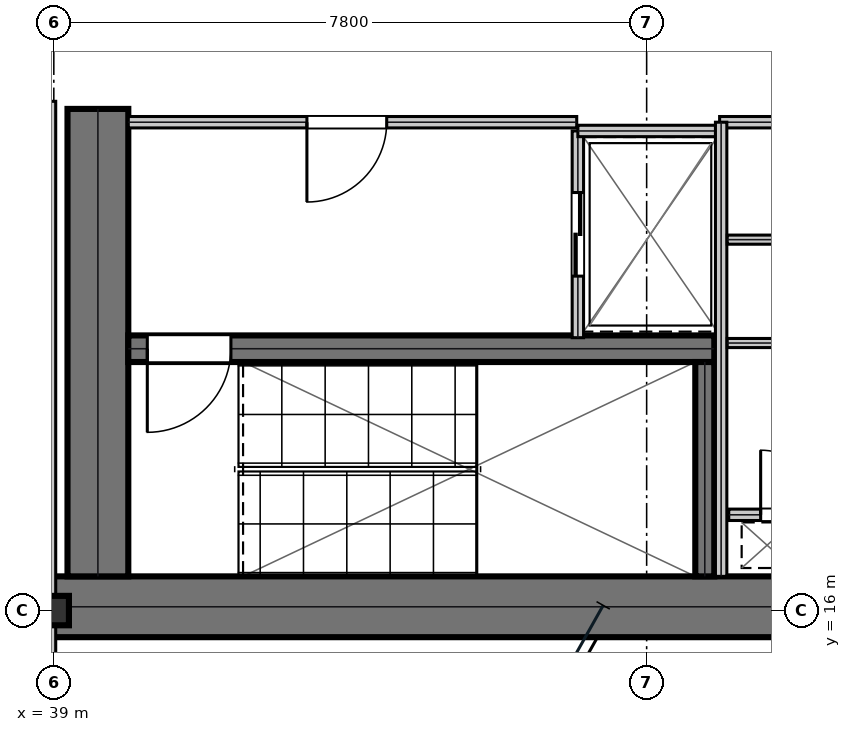
"""IFC4 building model, lengths in metres.
Left out: names, types, materials, properties, quantities, classifications, styles, units other than length and angle.
Written with IfcOpenShell. Run it as: python <this file> out.ifc"""

import sys

from ifc_helpers import new_model, si_unit, direction, frame, frame_2d, origin, origin_2d, place, context, subcontext, project, spatial, rectangle, i_section, extrude, element, fill, save


model = new_model("IFC4")
c1 = context("Model", 3, precision=1e-05, world=origin(), true_north=direction((0.0, 1.0)))
c2 = subcontext(c1, "Body", "Model", "MODEL_VIEW")
j1 = project(units=[si_unit("LENGTHUNIT", "METRE"), si_unit("PLANEANGLEUNIT", "RADIAN")], contexts=[c1])
p1 = place(None, origin())
s1 = spatial("IfcSite", under=j1, at=p1, CompositionType="ELEMENT")
p2 = place(p1, origin())
s2 = spatial("IfcBuilding", under=s1, at=p2, CompositionType="ELEMENT")
p3 = place(p2, frame((0.0, 0.0, 165.45)))
s3 = spatial("IfcBuildingStorey", under=s2, at=p3, CompositionType="ELEMENT", Elevation=165.45)
p4 = place(p3, frame((38.8, 16.05, 0.0), z_axis=(0.0, 0.0, 1.0), x_axis=(1.0, 0.0, 0.0)))
e1 = element("IfcWall", 1, at=p4, inside=s3, PredefinedType="SHEAR", context=c2, shape_type="SweptSolid", body=[
    extrude(rectangle(XDim=16.0, YDim=0.8, at=frame_2d((8.0, 0.0))), origin(), (0.0, 0.0, 1.0), 3.81),
])
p5 = place(p3, frame((39.58, 16.45, 0.0), z_axis=(0.0, 0.0, 1.0), x_axis=(0.0, 1.0, 0.0)))
e2 = element("IfcWall", 2, at=p5, inside=s3, PredefinedType="SHEAR", context=c2, shape_type="SweptSolid", body=[
    extrude(rectangle(XDim=6.15, YDim=0.8, at=frame_2d((3.075, 0.0))), origin(), (0.0, 0.0, 1.0), 3.81),
])
p6 = place(p3, frame((39.98, 19.445, 0.0), z_axis=(0.0, 0.0, 1.0), x_axis=(1.0, 0.0, 0.0)))
e3 = element("IfcWall", 3, at=p6, inside=s3, PredefinedType="SHEAR", context=c2, shape_type="SweptSolid", body=[
    extrude(rectangle(XDim=7.71, YDim=0.35, at=frame_2d((3.855, 0.0))), origin(), (0.0, 0.0, 1.0), 3.81),
])
p7 = place(p6, frame((0.25, 0.0, 0.0)))
e4 = element("IfcOpeningElement", 4, at=p7, cuts=e3, PredefinedType="OPENING", context=c2, shape_type="SweptSolid", body=[
    extrude(rectangle(XDim=1.1, YDim=2.15, at=frame_2d((0.55, 1.075))), frame((0.0, 0.185, 0.0), z_axis=(0.0, -1.0, 0.0), x_axis=(1.0, 0.0, 0.0)), (0.0, 0.0, 1.0), 0.37),
])
p8 = place(p3, frame((47.565, 16.45, 0.0), z_axis=(0.0, 0.0, 1.0), x_axis=(0.0, 1.0, 0.0)))
e5 = element("IfcWall", 5, at=p8, inside=s3, PredefinedType="SHEAR", context=c2, shape_type="SweptSolid", body=[
    extrude(rectangle(XDim=2.82, YDim=0.25, at=frame_2d((1.41, 0.0))), origin(), (0.0, 0.0, 1.0), 3.81),
])
p9 = place(p3, frame((39.0, 16.0, 0.0), z_axis=(0.0, 0.0, 1.0), x_axis=(1.0, 0.0, 0.0)))
e6 = element("IfcColumn", 6, at=p9, inside=s3, PredefinedType="COLUMN", context=c2, shape_type="SweptSolid", body=[
    extrude(i_section(OverallWidth=0.398, OverallDepth=0.387, WebThickness=0.021, FlangeThickness=0.033, at=origin_2d()), origin(), (0.0, 0.0, 1.0), 4.044),
])
p10 = place(p3, frame((39.98, 22.425, 0.0), z_axis=(0.0, 0.0, 1.0), x_axis=(1.0, 0.0, 0.0)))
e7 = element("IfcWall", 7, at=p10, inside=s3, PredefinedType="PARTITIONING", context=c2, shape_type="SweptSolid", body=[
    extrude(rectangle(XDim=5.9, YDim=0.15, at=frame_2d((2.95, 0.0))), origin(), (0.0, 0.0, 1.0), 3.81),
])
p11 = place(p10, frame((2.35, 0.0, 0.0)))
e8 = element("IfcOpeningElement", 8, at=p11, cuts=e7, PredefinedType="OPENING", context=c2, shape_type="SweptSolid", body=[
    extrude(rectangle(XDim=1.05, YDim=2.15, at=frame_2d((0.525, 1.075))), frame((0.0, 0.085, 0.0), z_axis=(0.0, -1.0, 0.0), x_axis=(1.0, 0.0, 0.0)), (0.0, 0.0, 1.0), 0.17),
])
p12 = place(p3, frame((45.895, 19.59, 0.0), z_axis=(0.0, 0.0, 1.0), x_axis=(0.0, 1.0, 0.0)))
e9 = element("IfcWall", 9, at=p12, inside=s3, PredefinedType="PARTITIONING", context=c2, shape_type="SweptSolid", body=[
    extrude(rectangle(XDim=2.72, YDim=0.15, at=frame_2d((1.36, 0.0))), origin(), (0.0, 0.0, 1.0), 3.81),
])
p13 = place(p12, frame((0.81, 0.0, 0.0)))
e10 = element("IfcOpeningElement", 10, at=p13, cuts=e9, PredefinedType="OPENING", context=c2, shape_type="SweptSolid", body=[
    extrude(rectangle(XDim=1.1, YDim=2.15, at=frame_2d((0.55, 1.075))), frame((0.0, 0.085, 0.0), z_axis=(0.0, -1.0, 0.0), x_axis=(1.0, 0.0, 0.0)), (0.0, 0.0, 1.0), 0.17),
])
p14 = place(p3, frame((45.895, 22.31, 0.0), z_axis=(0.0, 0.0, 1.0), x_axis=(1.0, 0.0, 0.0)))
e11 = element("IfcWall", 11, at=p14, inside=s3, PredefinedType="PARTITIONING", context=c2, shape_type="SweptSolid", body=[
    extrude(rectangle(XDim=1.915, YDim=0.15, at=frame_2d((0.958, 0.0))), origin(), (0.0, 0.0, 1.0), 3.81),
])
p15 = place(p3, frame((47.88, 17.26, 0.0), z_axis=(0.0, 0.0, 1.0), x_axis=(1.0, 0.0, 0.0)))
e12 = element("IfcWall", 12, at=p15, inside=s3, PredefinedType="PARTITIONING", context=c2, shape_type="SweptSolid", body=[
    extrude(rectangle(XDim=1.72, YDim=0.15, at=frame_2d((0.86, 0.0))), origin(), (0.0, 0.0, 1.0), 3.81),
])
p16 = place(p15, frame((0.42, 0.0, 0.0)))
e13 = element("IfcOpeningElement", 13, at=p16, cuts=e12, PredefinedType="OPENING", context=c2, shape_type="SweptSolid", body=[
    extrude(rectangle(XDim=0.85, YDim=2.15, at=frame_2d((0.425, 1.075))), frame((0.0, 0.085, 0.0), z_axis=(0.0, -1.0, 0.0), x_axis=(1.0, 0.0, 0.0)), (0.0, 0.0, 1.0), 0.17),
])
p17 = place(p3, frame((47.76, 22.425, 0.0), z_axis=(0.0, 0.0, 1.0), x_axis=(1.0, 0.0, 0.0)))
e14 = element("IfcWall", 14, at=p17, inside=s3, PredefinedType="PARTITIONING", context=c2, shape_type="SweptSolid", body=[
    extrude(rectangle(XDim=1.96, YDim=0.15, at=frame_2d((0.98, 0.0))), origin(), (0.0, 0.0, 1.0), 3.81),
])
p18 = place(p3, frame((47.78, 16.45, 0.0), z_axis=(0.0, 0.0, 1.0), x_axis=(0.0, 1.0, 0.0)))
e15 = element("IfcWall", 15, at=p18, inside=s3, PredefinedType="PARTITIONING", context=c2, shape_type="SweptSolid", body=[
    extrude(rectangle(XDim=5.975, YDim=0.15, at=frame_2d((2.988, 0.0))), origin(), (0.0, 0.0, 1.0), 3.81),
])
for number, where, z_axis, x_axis in (
    (16, (47.86, 19.52, 0.0), (0.0, 0.0, 1.0), (1.0, 0.0, 0.0)),
    (17, (47.86, 20.88, 0.0), (0.0, 0.0, 1.0), (1.0, 0.0, 0.0)),
):
    element("IfcWall", number, at=place(p3, frame(where, z_axis=z_axis, x_axis=x_axis)), inside=s3, PredefinedType="PARTITIONING", context=c2, shape_type="SweptSolid", body=[
        extrude(rectangle(XDim=1.76, YDim=0.12, at=frame_2d((0.88, 0.0))), origin(), (0.0, 0.0, 1.0), 3.81),
    ])
p19 = place(p3, frame((38.95, 14.5, 0.0), z_axis=(0.0, 0.0, 1.0), x_axis=(0.0, 1.0, 0.0)))
e18 = element("IfcWall", 18, at=p19, inside=s3, PredefinedType="PARTITIONING", context=c2, shape_type="SweptSolid", body=[
    extrude(rectangle(XDim=8.2, YDim=0.15, at=frame_2d((4.1, 0.0))), origin(), (0.0, 0.0, 1.0), 3.19),
])
p20 = place(p11, frame((1.05, 0.0, 0.0), z_axis=(0.0, 0.0, 1.0), x_axis=(-1.0, 0.0, 0.0)))
e19 = element("IfcDoor", 19, at=p20, inside=s3, OperationType="SINGLE_SWING_RIGHT", PredefinedType="DOOR", context=c2, shape_type="SweptSolid", body=[
    extrude(rectangle(XDim=1.05, YDim=2.15, at=frame_2d((0.525, 1.075))), frame((0.0, 0.025, 0.0), z_axis=(0.0, -1.0, 0.0), x_axis=(1.0, 0.0, 0.0)), (0.0, 0.0, 1.0), 0.05),
])
fill(e8, e19)
p21 = place(p13, frame((1.1, 0.0, 0.0), z_axis=(0.0, 0.0, 1.0), x_axis=(-1.0, 0.0, 0.0)))
e20 = element("IfcDoor", 20, at=p21, inside=s3, OperationType="DOUBLE_DOOR_SLIDING", PredefinedType="DOOR", context=c2, shape_type="SweptSolid", body=[
    extrude(rectangle(XDim=1.1, YDim=2.15, at=frame_2d((0.55, 1.075))), frame((0.0, 0.025, 0.0), z_axis=(0.0, -1.0, 0.0), x_axis=(1.0, 0.0, 0.0)), (0.0, 0.0, 1.0), 0.05),
])
fill(e10, e20)
p22 = place(p16, origin())
e21 = element("IfcDoor", 21, at=p22, inside=s3, OperationType="SINGLE_SWING_LEFT", PredefinedType="TRAPDOOR", context=c2, shape_type="SweptSolid", body=[
    extrude(rectangle(XDim=0.85, YDim=2.15, at=frame_2d((0.425, 1.075))), frame((0.0, 0.025, 0.0), z_axis=(0.0, -1.0, 0.0), x_axis=(1.0, 0.0, 0.0)), (0.0, 0.0, 1.0), 0.05),
])
fill(e13, e21)
p23 = place(p7, frame((1.1, 0.0, 0.0), z_axis=(0.0, 0.0, 1.0), x_axis=(-1.0, 0.0, 0.0)))
e22 = element("IfcDoor", 22, at=p23, inside=s3, OperationType="SINGLE_SWING_RIGHT", PredefinedType="DOOR", context=c2, shape_type="SweptSolid", body=[
    extrude(rectangle(XDim=1.1, YDim=2.15, at=frame_2d((0.55, 1.075))), frame((0.0, 0.025, 0.0), z_axis=(0.0, -1.0, 0.0), x_axis=(1.0, 0.0, 0.0)), (0.0, 0.0, 1.0), 0.05),
])
fill(e4, e22)
save(model, sys.argv[1])
